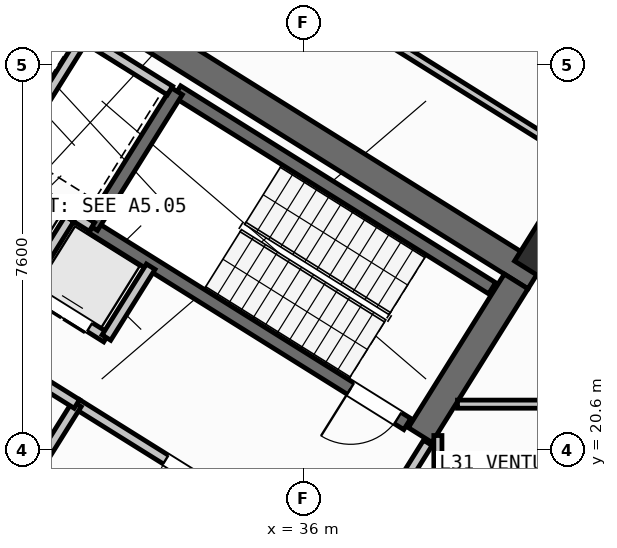
"""IFC4 building model, lengths in metres.
Left out: names, types, materials, properties, quantities, classifications, styles, units other than length and angle.
Written with IfcOpenShell. Run it as: python <this file> out.ifc"""

import sys

from ifc_helpers import new_model, si_unit, direction, frame, frame_2d, origin, origin_2d, place, context, subcontext, project, spatial, rectangle, hollow_rectangle, extrude, source, transform, mapped, element, fill, save


model = new_model("IFC4")
c1 = context("Model", 3, precision=1e-05, world=origin(), true_north=direction((0.0, 1.0)))
c2 = subcontext(c1, "Body", "Model", "MODEL_VIEW")
j1 = project(units=[si_unit("LENGTHUNIT", "METRE"), si_unit("PLANEANGLEUNIT", "RADIAN")], contexts=[c1])
p1 = place(None, origin())
s1 = spatial("IfcSite", under=j1, at=p1, CompositionType="ELEMENT")
p2 = place(p1, origin())
s2 = spatial("IfcBuilding", under=s1, at=p2, CompositionType="ELEMENT")
p3 = place(p2, frame((0.0, 0.0, 123.3)))
s3 = spatial("IfcBuildingStorey", under=s2, at=p3, CompositionType="ELEMENT", Elevation=123.3)
p4 = place(p3, frame((40.573, 24.01, 0.0), z_axis=(0.0, 0.0, 1.0), x_axis=(-0.848047359947, 0.529920442413, 0.0)))
e1 = element("IfcWall", 1, at=p4, inside=s3, PredefinedType="SHEAR", context=c2, shape_type="SweptSolid", body=[
    extrude(rectangle(XDim=13.14, YDim=0.55, at=frame_2d((6.57, 0.0))), origin(), (0.0, 0.0, 1.0), 4.22),
])
p5 = place(p3, frame((40.194, 23.922, 0.0), z_axis=(0.0, 0.0, 1.0), x_axis=(-0.529888438328, -0.848067357541, 0.0)))
e2 = element("IfcWall", 2, at=p5, inside=s3, PredefinedType="SHEAR", context=c2, shape_type="SweptSolid", body=[
    extrude(rectangle(XDim=3.575, YDim=0.55, at=frame_2d((1.788, 0.0))), origin(), (0.0, 0.0, 1.0), 4.22),
])
m1 = source(origin(), c2, "Body", "SweptSolid", [
    extrude(hollow_rectangle(XDim=0.9, YDim=0.9, WallThickness=0.036, at=origin_2d()), origin(), (0.0, 0.0, 1.0), 4.5),
])
p6 = place(p3, frame((40.783, 24.469, 0.0), z_axis=(0.0, 0.0, 1.0), x_axis=(-0.848048096156, 0.529919264233, 0.0)))
e3 = element("IfcColumn", 3, at=p6, inside=s3, PredefinedType="COLUMN", context=c2, shape_type="MappedRepresentation", body=[
    mapped(m1, transform((0.0, 0.0, 0.0), scale=1.0)),
])
p7 = place(p3, frame((31.76, 12.183, 0.0), z_axis=(0.0, 0.0, 1.0), x_axis=(-0.848047074256, 0.529920899612, 0.0)))
e4 = element("IfcWall", 4, at=p7, inside=s3, PredefinedType="STANDARD", context=c2, shape_type="SweptSolid", body=[
    extrude(rectangle(XDim=30.652, YDim=0.32, at=frame_2d((15.326, 0.0))), origin(), (0.0, 0.0, 1.0), 4.22),
])
p8 = place(p7, frame((14.966, 0.0, 0.0)))
e5 = element("IfcOpeningElement", 5, at=p8, cuts=e4, PredefinedType="OPENING", context=c2, shape_type="SweptSolid", body=[
    extrude(rectangle(XDim=1.2, YDim=2.15, at=frame_2d((0.6, 1.075))), frame((0.0, 0.17, 0.0), z_axis=(0.0, -1.0, 0.0), x_axis=(1.0, 0.0, 0.0)), (0.0, 0.0, 1.0), 0.34),
])
p9 = place(p7, frame((1.871, 0.0, 0.8)))
e6 = element("IfcOpeningElement", 6, at=p9, cuts=e4, PredefinedType="OPENING", context=c2, shape_type="SweptSolid", body=[
    extrude(rectangle(XDim=2.1, YDim=1.55, at=frame_2d((1.05, 0.775))), frame((0.0, 0.17, 0.0), z_axis=(0.0, -1.0, 0.0), x_axis=(1.0, 0.0, 0.0)), (0.0, 0.0, 1.0), 0.34),
])
p10 = place(p7, frame((6.546, 0.0, 0.8)))
e7 = element("IfcOpeningElement", 7, at=p10, cuts=e4, PredefinedType="OPENING", context=c2, shape_type="SweptSolid", body=[
    extrude(rectangle(XDim=2.1, YDim=1.55, at=frame_2d((1.05, 0.775))), frame((0.0, 0.17, 0.0), z_axis=(0.0, -1.0, 0.0), x_axis=(1.0, 0.0, 0.0)), (0.0, 0.0, 1.0), 0.34),
])
p11 = place(p7, frame((20.508, 0.0, 0.85)))
e8 = element("IfcOpeningElement", 8, at=p11, cuts=e4, PredefinedType="OPENING", context=c2, shape_type="SweptSolid", body=[
    extrude(rectangle(XDim=1.5, YDim=1.5, at=frame_2d((0.75, 0.75))), frame((0.0, 0.17, 0.0), z_axis=(0.0, -1.0, 0.0), x_axis=(1.0, 0.0, 0.0)), (0.0, 0.0, 1.0), 0.34),
])
p12 = place(p7, frame((27.253, 0.0, 0.95)))
e9 = element("IfcOpeningElement", 9, at=p12, cuts=e4, PredefinedType="OPENING", context=c2, shape_type="SweptSolid", body=[
    extrude(rectangle(XDim=1.2, YDim=1.4, at=frame_2d((0.6, 0.7))), frame((0.0, 0.17, 0.0), z_axis=(0.0, -1.0, 0.0), x_axis=(1.0, 0.0, 0.0)), (0.0, 0.0, 1.0), 0.34),
])
p13 = place(p3, frame((31.28, 18.261, 0.0), z_axis=(0.0, 0.0, 1.0), x_axis=(-0.848051618787, 0.529913626805, 0.0)))
e10 = element("IfcWall", 10, at=p13, inside=s3, PredefinedType="SHEAR", context=c2, shape_type="SweptSolid", body=[
    extrude(rectangle(XDim=7.46, YDim=0.26, at=frame_2d((3.73, 0.0))), origin(), (0.0, 0.0, 1.0), 4.22),
])
p14 = place(p13, frame((0.36, 0.0, 0.0)))
e11 = element("IfcOpeningElement", 11, at=p14, cuts=e10, PredefinedType="OPENING", context=c2, shape_type="SweptSolid", body=[
    extrude(rectangle(XDim=0.86, YDim=2.05, at=frame_2d((0.43, 1.025))), frame((0.0, 0.14, 0.0), z_axis=(0.0, -1.0, 0.0), x_axis=(1.0, 0.0, 0.0)), (0.0, 0.0, 1.0), 0.28),
])
p15 = place(p3, frame((39.721, 23.788, 0.0), z_axis=(0.0, 0.0, 1.0), x_axis=(-0.848054434086, 0.529909121291, 0.0)))
e12 = element("IfcWall", 12, at=p15, inside=s3, PredefinedType="SHEAR", context=c2, shape_type="SweptSolid", body=[
    extrude(rectangle(XDim=7.33, YDim=0.26, at=frame_2d((3.665, 0.0))), origin(), (0.0, 0.0, 1.0), 4.22),
])
p16 = place(p3, frame((38.046, 21.108, 0.0), z_axis=(0.0, 0.0, 1.0), x_axis=(-0.848054434086, 0.529909121291, 0.0)))
e13 = element("IfcWall", 13, at=p16, inside=s3, PredefinedType="SHEAR", context=c2, shape_type="SweptSolid", body=[
    extrude(rectangle(XDim=7.33, YDim=0.26, at=frame_2d((3.665, 0.0))), origin(), (0.0, 0.0, 1.0), 4.22),
])
p17 = place(p16, frame((0.22, 0.0, 0.0)))
e14 = element("IfcOpeningElement", 14, at=p17, cuts=e13, PredefinedType="OPENING", context=c2, shape_type="SweptSolid", body=[
    extrude(rectangle(XDim=1.1, YDim=2.1, at=frame_2d((0.55, 1.05))), frame((0.0, 0.14, 0.0), z_axis=(0.0, -1.0, 0.0), x_axis=(1.0, 0.0, 0.0)), (0.0, 0.0, 1.0), 0.28),
])
p18 = place(p3, frame((33.496, 27.677, 0.0), z_axis=(0.0, 0.0, 1.0), x_axis=(-0.529908658664, -0.84805472316, 0.0)))
e15 = element("IfcWall", 15, at=p18, inside=s3, PredefinedType="SHEAR", context=c2, shape_type="SweptSolid", body=[
    extrude(rectangle(XDim=3.16, YDim=0.26, at=frame_2d((1.58, 0.0))), origin(), (0.0, 0.0, 1.0), 4.22),
])
p19 = place(p3, frame((36.417, 18.447, 0.0), z_axis=(0.0, 0.0, 1.0), x_axis=(-0.848064879198, 0.529892404805, 0.0)))
e16 = element("IfcWall", 16, at=p19, inside=s3, PredefinedType="STANDARD", context=c2, shape_type="SweptSolid", body=[
    extrude(rectangle(XDim=5.768, YDim=0.2, at=frame_2d((2.884, 0.0))), origin(), (0.0, 0.0, 1.0), 4.21),
])
p20 = place(p19, frame((2.548, 0.0, 0.0)))
e17 = element("IfcOpeningElement", 17, at=p20, cuts=e16, PredefinedType="OPENING", context=c2, shape_type="SweptSolid", body=[
    extrude(rectangle(XDim=1.15, YDim=2.1, at=frame_2d((0.575, 1.05))), frame((0.0, 0.11, 0.0), z_axis=(0.0, -1.0, 0.0), x_axis=(1.0, 0.0, 0.0)), (0.0, 0.0, 1.0), 0.22),
])
p21 = place(p3, frame((31.822, 24.998, 0.0), z_axis=(0.0, 0.0, 1.0), x_axis=(-0.848036912365, 0.52993716162, 0.0)))
e18 = element("IfcWall", 18, at=p21, inside=s3, PredefinedType="STANDARD", context=c2, shape_type="SweptSolid", body=[
    extrude(rectangle(XDim=4.618, YDim=0.2, at=frame_2d((2.309, 0.0))), origin(), (0.0, 0.0, 1.0), 4.21),
])
p22 = place(p3, frame((32.108, 22.814, 0.0), z_axis=(0.0, 0.0, 1.0), x_axis=(-0.848042229521, 0.529928652696, 0.0)))
e19 = element("IfcWall", 19, at=p22, inside=s3, PredefinedType="STANDARD", context=c2, shape_type="SweptSolid", body=[
    extrude(rectangle(XDim=5.62, YDim=0.2, at=frame_2d((2.81, 0.0))), origin(), (0.0, 0.0, 1.0), 4.21),
])
p23 = place(p22, frame((0.39, 0.0, 0.0)))
e20 = element("IfcOpeningElement", 20, at=p23, cuts=e19, PredefinedType="OPENING", context=c2, shape_type="SweptSolid", body=[
    extrude(rectangle(XDim=1.1, YDim=2.15, at=frame_2d((0.55, 1.075))), frame((0.0, 0.11, 0.0), z_axis=(0.0, -1.0, 0.0), x_axis=(1.0, 0.0, 0.0)), (0.0, 0.0, 1.0), 0.22),
])
p24 = place(p22, frame((2.25, 0.0, 0.0)))
e21 = element("IfcOpeningElement", 21, at=p24, cuts=e19, PredefinedType="OPENING", context=c2, shape_type="SweptSolid", body=[
    extrude(rectangle(XDim=1.1, YDim=2.15, at=frame_2d((0.55, 1.075))), frame((0.0, 0.11, 0.0), z_axis=(0.0, -1.0, 0.0), x_axis=(1.0, 0.0, 0.0)), (0.0, 0.0, 1.0), 0.22),
])
p25 = place(p22, frame((4.11, 0.0, 0.0)))
e22 = element("IfcOpeningElement", 22, at=p25, cuts=e19, PredefinedType="OPENING", context=c2, shape_type="SweptSolid", body=[
    extrude(rectangle(XDim=1.1, YDim=2.15, at=frame_2d((0.55, 1.075))), frame((0.0, 0.11, 0.0), z_axis=(0.0, -1.0, 0.0), x_axis=(1.0, 0.0, 0.0)), (0.0, 0.0, 1.0), 0.22),
])
p26 = place(p3, frame((32.982, 24.213, 0.0), z_axis=(0.0, 0.0, 1.0), x_axis=(-0.529839334948, -0.84809803628, 0.0)))
e23 = element("IfcWall", 23, at=p26, inside=s3, PredefinedType="STANDARD", context=c2, shape_type="SweptSolid", body=[
    extrude(rectangle(XDim=1.65, YDim=0.2, at=frame_2d((0.825, 0.0))), origin(), (0.0, 0.0, 1.0), 4.21),
])
p27 = place(p3, frame((31.645, 28.716, 0.0), z_axis=(0.0, 0.0, 1.0), x_axis=(-0.52986693015, -0.848080795876, 0.0)))
e24 = element("IfcWall", 24, at=p27, inside=s3, PredefinedType="STANDARD", context=c2, shape_type="SweptSolid", body=[
    extrude(rectangle(XDim=2.66, YDim=0.2, at=frame_2d((1.33, 0.0))), origin(), (0.0, 0.0, 1.0), 4.21),
])
p28 = place(p3, frame((33.363, 27.69, 0.0), z_axis=(0.0, 0.0, 1.0), x_axis=(-0.848047090064, 0.529920874315, 0.0)))
e25 = element("IfcWall", 25, at=p28, inside=s3, PredefinedType="STANDARD", context=c2, shape_type="SweptSolid", body=[
    extrude(rectangle(XDim=4.498, YDim=0.2, at=frame_2d((2.249, 0.0))), origin(), (0.0, 0.0, 1.0), 4.21),
])
p29 = place(p3, frame((31.379, 25.156, 0.0), z_axis=(0.0, 0.0, 1.0), x_axis=(-0.529998940003, -0.847998304005, 0.0)))
e26 = element("IfcWall", 26, at=p29, inside=s3, PredefinedType="STANDARD", context=c2, shape_type="SweptSolid", body=[
    extrude(rectangle(XDim=1.58, YDim=0.2, at=frame_2d((0.79, 0.0))), origin(), (0.0, 0.0, 1.0), 4.21),
])
p30 = place(p3, frame((31.525, 21.504, 0.0), z_axis=(0.0, 0.0, 1.0), x_axis=(-0.529907497854, -0.848055448493, 0.0)))
e27 = element("IfcWall", 27, at=p30, inside=s3, PredefinedType="STANDARD", context=c2, shape_type="SweptSolid", body=[
    extrude(rectangle(XDim=2.88, YDim=0.2, at=frame_2d((1.44, 0.0))), origin(), (0.0, 0.0, 1.0), 4.21),
])
p31 = place(p3, frame((31.525, 21.504, 0.0), z_axis=(0.0, 0.0, 1.0), x_axis=(-0.848040211232, 0.529931882541, 0.0)))
e28 = element("IfcWall", 28, at=p31, inside=s3, PredefinedType="STANDARD", context=c2, shape_type="SweptSolid", body=[
    extrude(rectangle(XDim=6.218, YDim=0.2, at=frame_2d((3.109, 0.0))), origin(), (0.0, 0.0, 1.0), 4.21),
])
p32 = place(p31, frame((4.4, 0.0, 0.0)))
e29 = element("IfcOpeningElement", 29, at=p32, cuts=e28, PredefinedType="OPENING", context=c2, shape_type="SweptSolid", body=[
    extrude(rectangle(XDim=0.86, YDim=2.05, at=frame_2d((0.43, 1.025))), frame((0.0, 0.11, 0.0), z_axis=(0.0, -1.0, 0.0), x_axis=(1.0, 0.0, 0.0)), (0.0, 0.0, 1.0), 0.22),
])
p33 = place(p31, frame((1.45, 0.0, 0.0)))
e30 = element("IfcOpeningElement", 30, at=p33, cuts=e28, PredefinedType="OPENING", context=c2, shape_type="SweptSolid", body=[
    extrude(rectangle(XDim=0.86, YDim=2.05, at=frame_2d((0.43, 1.025))), frame((0.0, 0.11, 0.0), z_axis=(0.0, -1.0, 0.0), x_axis=(1.0, 0.0, 0.0)), (0.0, 0.0, 1.0), 0.22),
])
p34 = place(p3, frame((41.936, 26.012, 0.0), z_axis=(0.0, 0.0, 1.0), x_axis=(-0.848051154596, 0.529914369676, 0.0)))
e31 = element("IfcWall", 31, at=p34, inside=s3, PredefinedType="PARTITIONING", context=c2, shape_type="SweptSolid", body=[
    extrude(rectangle(XDim=15.57, YDim=0.16, at=frame_2d((7.785, 0.0))), origin(), (0.0, 0.0, 1.0), 4.21),
])
p35 = place(p34, frame((10.83, 0.0, 0.0)))
e32 = element("IfcOpeningElement", 32, at=p35, cuts=e31, PredefinedType="OPENING", context=c2, shape_type="SweptSolid", body=[
    extrude(rectangle(XDim=1.0, YDim=2.1, at=frame_2d((0.5, 1.05))), frame((0.0, 0.09, 0.0), z_axis=(0.0, -1.0, 0.0), x_axis=(1.0, 0.0, 0.0)), (0.0, 0.0, 1.0), 0.18),
])
p36 = place(p3, frame((38.451, 20.737, 0.0), z_axis=(0.0, 0.0, 1.0), x_axis=(-0.529924799939, -0.848044637038, 0.0)))
e33 = element("IfcWall", 33, at=p36, inside=s3, PredefinedType="STANDARD", context=c2, shape_type="SweptSolid", body=[
    extrude(rectangle(XDim=2.96, YDim=0.2, at=frame_2d((1.48, 0.0))), origin(), (0.0, 0.0, 1.0), 2.395),
])
p37 = place(p36, frame((1.46, 0.0, 0.0)))
e34 = element("IfcOpeningElement", 34, at=p37, cuts=e33, PredefinedType="OPENING", context=c2, shape_type="SweptSolid", body=[
    extrude(rectangle(XDim=0.86, YDim=2.05, at=frame_2d((0.43, 1.025))), frame((0.0, 0.11, 0.0), z_axis=(0.0, -1.0, 0.0), x_axis=(1.0, 0.0, 0.0)), (0.0, 0.0, 1.0), 0.22),
])
p38 = place(p3, frame((38.65, 17.93, 0.0), z_axis=(0.0, 0.0, 1.0), x_axis=(0.0, 1.0, 0.0)))
e35 = element("IfcWall", 35, at=p38, inside=s3, PredefinedType="PARTITIONING", context=c2, shape_type="SweptSolid", body=[
    extrude(rectangle(XDim=2.951, YDim=0.16, at=frame_2d((1.476, 0.0))), origin(), (0.0, 0.0, 1.0), 4.21),
])
p39 = place(p3, frame((39.037, 21.5, 0.0), z_axis=(0.0, 0.0, 1.0), x_axis=(1.0, 0.0, 0.0)))
e36 = element("IfcWall", 36, at=p39, inside=s3, PredefinedType="PARTITIONING", context=c2, shape_type="SweptSolid", body=[
    extrude(rectangle(XDim=7.215, YDim=0.16, at=frame_2d((3.607, 0.0))), origin(), (0.0, 0.0, 1.0), 4.21),
])
m2 = source(origin(), c2, "Body", "SweptSolid", [
    extrude(rectangle(XDim=1.1, YDim=2.1, at=frame_2d((0.55, 1.05))), frame((0.0, 0.025, 0.0), z_axis=(0.0, -1.0, 0.0), x_axis=(1.0, 0.0, 0.0)), (0.0, 0.0, 1.0), 0.05),
])
p40 = place(p17, origin())
e37 = element("IfcDoor", 37, at=p40, inside=s3, OperationType="SINGLE_SWING_RIGHT", PredefinedType="DOOR", context=c2, shape_type="MappedRepresentation", body=[
    mapped(m2, transform((0.0, 0.0, 0.0), scale=1.0)),
])
fill(e14, e37)
m3 = source(origin(), c2, "Body", "SweptSolid", [
    extrude(rectangle(XDim=1.15, YDim=2.1, at=frame_2d((0.575, 1.05))), frame((0.0, 0.025, 0.0), z_axis=(0.0, -1.0, 0.0), x_axis=(1.0, 0.0, 0.0)), (0.0, 0.0, 1.0), 0.05),
])
p41 = place(p20, origin())
e38 = element("IfcDoor", 38, at=p41, inside=s3, OperationType="SINGLE_SWING_LEFT", PredefinedType="DOOR", context=c2, shape_type="MappedRepresentation", body=[
    mapped(m3, transform((0.0, 0.0, 0.0), scale=1.0)),
])
fill(e17, e38)
m4 = source(origin(), c2, "Body", "SweptSolid", [
    extrude(rectangle(XDim=1.1, YDim=2.15, at=frame_2d((0.55, 1.075))), frame((0.0, 0.025, 0.0), z_axis=(0.0, -1.0, 0.0), x_axis=(1.0, 0.0, 0.0)), (0.0, 0.0, 1.0), 0.05),
])
p42 = place(p23, origin())
e39 = element("IfcDoor", 39, at=p42, inside=s3, OperationType="DOUBLE_DOOR_SLIDING", PredefinedType="DOOR", context=c2, shape_type="MappedRepresentation", body=[
    mapped(m4, transform((0.0, 0.0, 0.0), scale=1.0)),
])
fill(e20, e39)
save(model, sys.argv[1])
